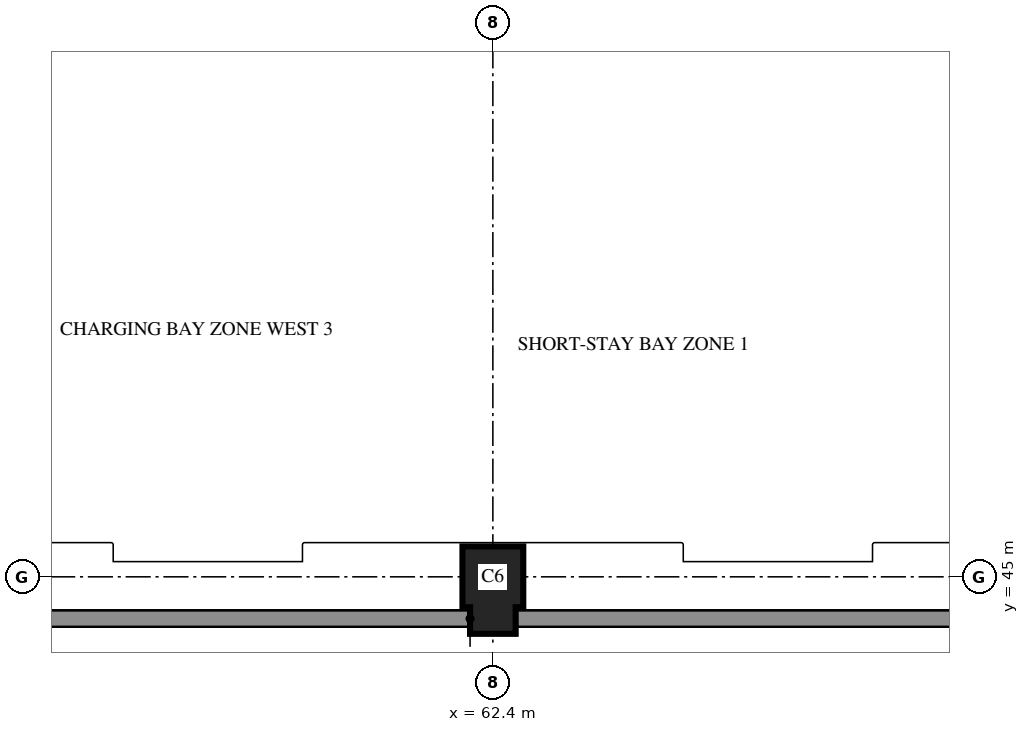
"""IFC4 building model, lengths in metres.
Left out: names, types, materials, properties, quantities, classifications, styles, units other than length and angle.
Written with IfcOpenShell. Run it as: python <this file> out.ifc"""

import sys

from ifc_helpers import new_model, si_unit, direction, frame, origin, place, context, subcontext, project, spatial, polyline, outline, extrude, element, save


model = new_model("IFC4")
c1 = context("Model", 3, precision=1e-05, world=origin(), true_north=direction((0.0, 1.0)))
c2 = subcontext(c1, "Body", "Model", "MODEL_VIEW")
j1 = project(units=[si_unit("LENGTHUNIT", "METRE"), si_unit("PLANEANGLEUNIT", "RADIAN")], contexts=[c1])
p1 = place(None, origin())
s1 = spatial("IfcSite", under=j1, at=p1, CompositionType="ELEMENT")
p2 = place(p1, origin())
s2 = spatial("IfcBuilding", under=s1, at=p2, CompositionType="ELEMENT")
p3 = place(p2, frame((0.0, 0.0, 11.9)))
s3 = spatial("IfcBuildingStorey", under=s2, at=p3, CompositionType="ELEMENT", Elevation=11.9)
p4 = place(p3, frame((62.4, 45.0, 0.0), z_axis=(0.0, 0.0, 1.0), x_axis=(0.0, -1.0, 0.0)))
e1 = element("IfcColumn", 1, at=p4, inside=s3, PredefinedType="COLUMN", context=c2, shape_type="SweptSolid", body=[
    extrude(outline(polyline([(-0.4, -0.4), (0.4, -0.4), (0.4, -0.3), (0.75, -0.3), (0.75, 0.3), (0.4, 0.3), (0.4, 0.4), (-0.4, 0.4), (-0.4, -0.4)])), origin(), (0.0, 0.0, 1.0), 3.7),
])
save(model, sys.argv[1])
